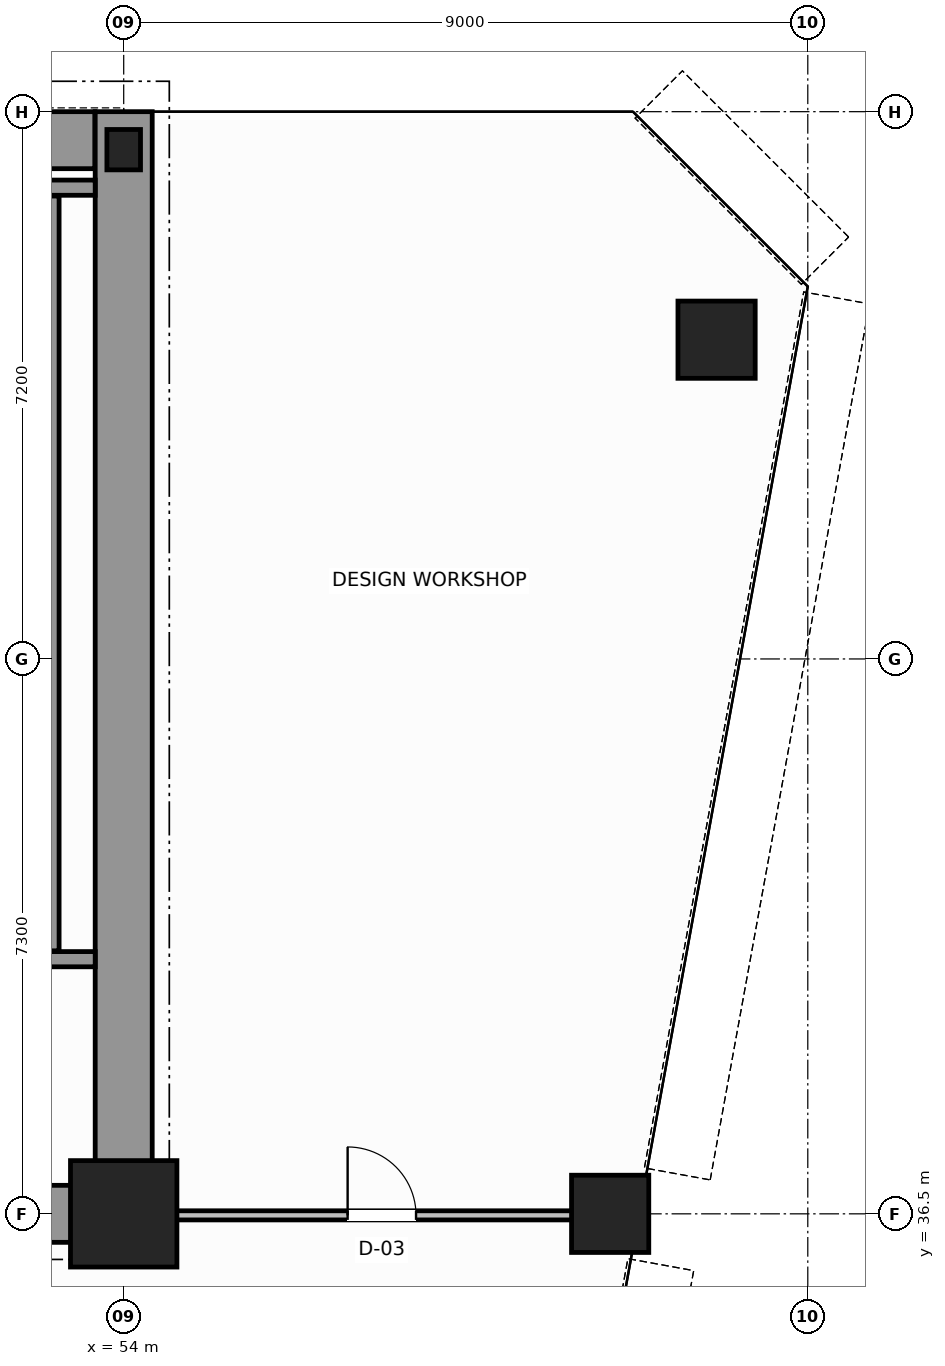
"""IFC4 building model, lengths in metres.
Left out: names, types, materials, properties, quantities, classifications, styles, units other than length and angle.
Written with IfcOpenShell. Run it as: python <this file> out.ifc"""

import sys

from ifc_helpers import new_model, si_unit, direction, frame, frame_2d, origin, origin_2d, place, context, subcontext, project, spatial, rectangle, hollow_circle, i_section, extrude, source, transform, mapped, element, fill, save


model = new_model("IFC4")
c1 = context("Model", 3, precision=1e-05, world=origin(), true_north=direction((0.0, 1.0)))
c2 = subcontext(c1, "Body", "Model", "MODEL_VIEW")
j1 = project(units=[si_unit("LENGTHUNIT", "METRE"), si_unit("PLANEANGLEUNIT", "RADIAN")], contexts=[c1])
p1 = place(None, origin())
s1 = spatial("IfcSite", under=j1, at=p1, CompositionType="ELEMENT")
p2 = place(p1, origin())
s2 = spatial("IfcBuilding", under=s1, at=p2, CompositionType="ELEMENT")
p3 = place(p2, frame((0.0, 0.0, 122.4)))
s3 = spatial("IfcBuildingStorey", under=s2, at=p3, CompositionType="ELEMENT", Elevation=122.4)
m1 = source(origin(), c2, "Body", "SweptSolid", [
    extrude(rectangle(XDim=1.4, YDim=1.4, at=origin_2d()), origin(), (0.0, 0.0, 1.0), 3.8),
])
p4 = place(p3, frame((54.0, 36.5, 0.0), z_axis=(0.0, 0.0, 1.0), x_axis=(1.0, 0.0, 0.0)))
e1 = element("IfcColumn", 1, at=p4, inside=s3, PredefinedType="COLUMN", context=c2, shape_type="MappedRepresentation", body=[
    mapped(m1, transform((0.0, 0.0, 0.0), scale=1.0)),
])
m2 = source(origin(), c2, "Body", "SweptSolid", [
    extrude(i_section(OverallWidth=0.442, OverallDepth=0.531, WebThickness=0.065, FlangeThickness=0.076, FilletRadius=0.015, at=origin_2d()), origin(), (0.0, 0.0, 1.0), 3.8),
])
p5 = place(p3, frame((54.0, 50.5, 0.0), z_axis=(0.0, 0.0, 1.0), x_axis=(1.0, 0.0, 0.0)))
e2 = element("IfcColumn", 2, at=p5, inside=s3, PredefinedType="COLUMN", context=c2, shape_type="MappedRepresentation", body=[
    mapped(m2, transform((0.0, 0.0, 0.0), scale=1.0)),
])
m3 = source(origin(), c2, "Body", "SweptSolid", [
    extrude(hollow_circle(Radius=0.508, WallThickness=0.045, at=origin_2d()), origin(), (0.0, 0.0, 1.0), 3.8),
])
for number, where, z_axis, x_axis in (
    (3, (61.8, 48.0, 0.0), (0.0, 0.0, 1.0), (1.0, 0.0, 0.0)),
    (4, (60.4, 36.5, 0.0), (0.0, 0.0, 1.0), (1.0, 0.0, 0.0)),
):
    element("IfcColumn", number, at=place(p3, frame(where, z_axis=z_axis, x_axis=x_axis)), inside=s3, PredefinedType="COLUMN", context=c2, shape_type="MappedRepresentation", body=[
        mapped(m3, transform((0.0, 0.0, 0.0), scale=1.0)),
    ])
p6 = place(p3, frame((34.002, 50.625, 0.0), z_axis=(0.0, 0.0, 1.0), x_axis=(1.0, 0.0, 0.0)))
e5 = element("IfcWall", 5, at=p6, inside=s3, PredefinedType="SHEAR", context=c2, shape_type="SweptSolid", body=[
    extrude(rectangle(XDim=19.619, YDim=0.75, at=frame_2d((9.81, 0.0))), origin(), (0.0, 0.0, 1.0), 3.8),
])
p7 = place(p3, frame((54.0, 36.5, 0.0), z_axis=(0.0, 0.0, 1.0), x_axis=(0.0, 1.0, 0.0)))
e6 = element("IfcWall", 6, at=p7, inside=s3, PredefinedType="SHEAR", context=c2, shape_type="SweptSolid", body=[
    extrude(rectangle(XDim=14.5, YDim=0.75, at=frame_2d((7.25, 0.0))), origin(), (0.0, 0.0, 1.0), 3.8),
])
p8 = place(p3, frame((49.8, 36.5, 0.0), z_axis=(0.0, 0.0, 1.0), x_axis=(1.0, 0.0, 0.0)))
e7 = element("IfcWall", 7, at=p8, inside=s3, PredefinedType="SHEAR", context=c2, shape_type="SweptSolid", body=[
    extrude(rectangle(XDim=3.805, YDim=0.75, at=frame_2d((1.902, 0.0))), origin(), (0.0, 0.0, 1.0), 2.38),
])
p9 = place(p3, frame((49.4, 39.85, 0.0), z_axis=(0.0, 0.0, 1.0), x_axis=(1.0, 0.0, 0.0)))
e8 = element("IfcWall", 8, at=p9, inside=s3, PredefinedType="SOLIDWALL", context=c2, shape_type="SweptSolid", body=[
    extrude(rectangle(XDim=4.225, YDim=0.2, at=frame_2d((2.113, 0.0))), origin(), (0.0, 0.0, 1.0), 3.8),
])
p10 = place(p9, frame((1.325, 0.0, 0.0)))
e9 = element("IfcOpeningElement", 9, at=p10, cuts=e8, PredefinedType="OPENING", context=c2, shape_type="SweptSolid", body=[
    extrude(rectangle(XDim=1.1, YDim=2.15, at=frame_2d((0.55, 1.075))), frame((0.0, 0.11, 0.0), z_axis=(0.0, -1.0, 0.0), x_axis=(1.0, 0.0, 0.0)), (0.0, 0.0, 1.0), 0.22),
])
p11 = place(p3, frame((49.4, 50.0, 0.0), z_axis=(0.0, 0.0, 1.0), x_axis=(1.0, 0.0, 0.0)))
e10 = element("IfcWall", 10, at=p11, inside=s3, PredefinedType="SOLIDWALL", context=c2, shape_type="SweptSolid", body=[
    extrude(rectangle(XDim=4.225, YDim=0.2, at=frame_2d((2.113, 0.0))), origin(), (0.0, 0.0, 1.0), 3.8),
])
p12 = place(p3, frame((53.05, 39.96, 0.0), z_axis=(0.0, 0.0, 1.0), x_axis=(0.0, 1.0, 0.0)))
e11 = element("IfcWall", 11, at=p12, inside=s3, PredefinedType="SOLIDWALL", context=c2, shape_type="SweptSolid", body=[
    extrude(rectangle(XDim=9.93, YDim=0.2, at=frame_2d((4.965, 0.0))), origin(), (0.0, 0.0, 1.0), 3.8),
])
p13 = place(p3, frame((54.06, 36.48, 0.0), z_axis=(0.0, 0.0, 1.0), x_axis=(1.0, 0.0, 0.0)))
e12 = element("IfcWall", 12, at=p13, inside=s3, PredefinedType="PARTITIONING", context=c2, shape_type="SweptSolid", body=[
    extrude(rectangle(XDim=6.672, YDim=0.12, at=frame_2d((3.336, 0.0))), origin(), (0.0, 0.0, 1.0), 2.87),
])
p14 = place(p13, frame((2.886, 0.0, 0.0)))
e13 = element("IfcOpeningElement", 13, at=p14, cuts=e12, PredefinedType="OPENING", context=c2, shape_type="SweptSolid", body=[
    extrude(rectangle(XDim=0.9, YDim=2.15, at=frame_2d((0.45, 1.075))), frame((0.0, 0.07, 0.0), z_axis=(0.0, -1.0, 0.0), x_axis=(1.0, 0.0, 0.0)), (0.0, 0.0, 1.0), 0.14),
])
m4 = source(origin(), c2, "Body", "SweptSolid", [
    extrude(rectangle(XDim=0.9, YDim=2.15, at=frame_2d((0.45, 1.075))), frame((0.0, 0.025, 0.0), z_axis=(0.0, -1.0, 0.0), x_axis=(1.0, 0.0, 0.0)), (0.0, 0.0, 1.0), 0.05),
])
p15 = place(p14, origin())
e14 = element("IfcDoor", 14, at=p15, inside=s3, OperationType="SINGLE_SWING_RIGHT", PredefinedType="DOOR", context=c2, shape_type="MappedRepresentation", body=[
    mapped(m4, transform((0.0, 0.0, 0.0), scale=1.0)),
])
fill(e13, e14)
save(model, sys.argv[1])
